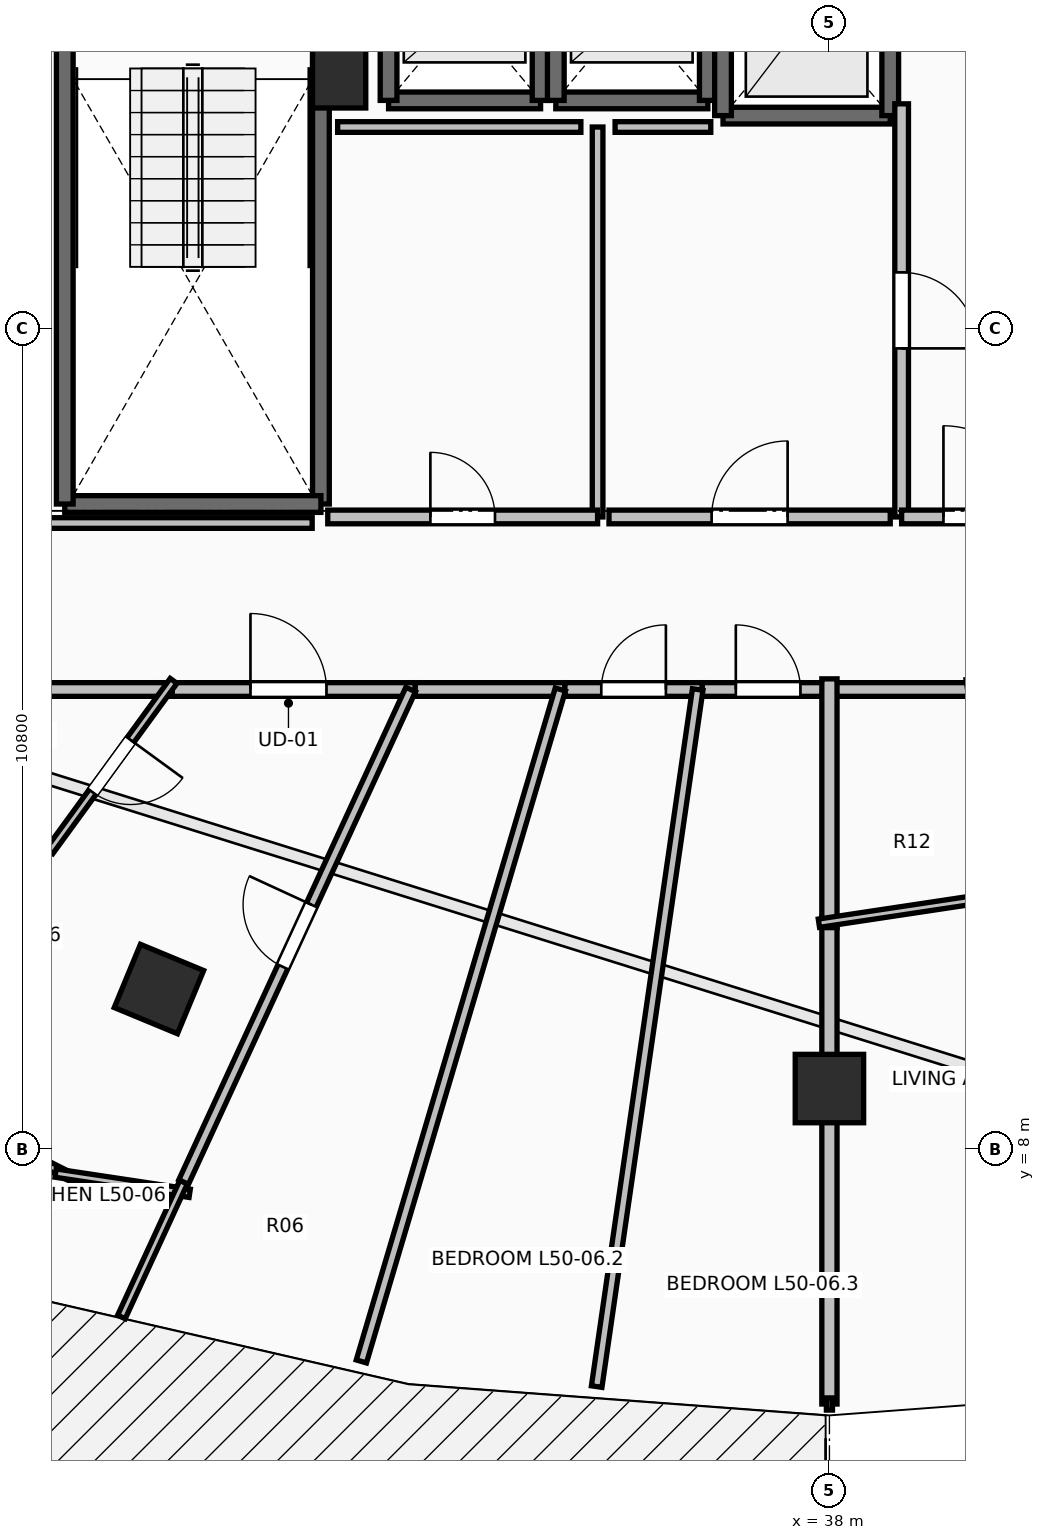
"""IFC4 building model, lengths in metres.
Left out: names, types, materials, properties, quantities, classifications, styles, units other than length and angle.
Written with IfcOpenShell. Run it as: python <this file> out.ifc"""

import sys

from ifc_helpers import new_model, si_unit, direction, frame, frame_2d, origin, origin_2d, place, context, subcontext, project, spatial, rectangle, extrude, element, fill, save


model = new_model("IFC4")
c1 = context("Model", 3, precision=1e-05, world=origin(), true_north=direction((0.0, 1.0)))
c2 = subcontext(c1, "Body", "Model", "MODEL_VIEW")
j1 = project(units=[si_unit("LENGTHUNIT", "METRE"), si_unit("PLANEANGLEUNIT", "RADIAN")], contexts=[c1])
p1 = place(None, origin())
s1 = spatial("IfcSite", under=j1, at=p1, CompositionType="ELEMENT")
p2 = place(p1, origin())
s2 = spatial("IfcBuilding", under=s1, at=p2, CompositionType="ELEMENT")
p3 = place(p2, frame((0.0, 0.0, 186.1)))
s3 = spatial("IfcBuildingStorey", under=s2, at=p3, CompositionType="ELEMENT", Elevation=186.1)
for number, where, z_axis, x_axis in (
    (1, (29.179, 10.109, 0.0), (0.0, 0.0, 1.0), (-0.383, -0.924, 0.0)),
    (2, (38.0, 8.8, 0.0), (0.0, 0.0, 1.0), (0.0, -1.0, 0.0)),
):
    element("IfcColumn", number, at=place(p3, frame(where, z_axis=z_axis, x_axis=x_axis)), inside=s3, PredefinedType="COLUMN", context=c2, shape_type="SweptSolid", body=[
        extrude(rectangle(XDim=0.9, YDim=0.9, at=origin_2d()), origin(), (0.0, 0.0, 1.0), 3.5),
    ])
p4 = place(p3, frame((31.55, 22.2, 0.0), z_axis=(0.0, 0.0, 1.0), x_axis=(1.0, 0.0, 0.0)))
e3 = element("IfcColumn", 3, at=p4, inside=s3, PredefinedType="PILASTER", context=c2, shape_type="SweptSolid", body=[
    extrude(rectangle(XDim=0.7, YDim=1.0, at=origin_2d()), origin(), (0.0, 0.0, 1.0), 3.5),
])
p5 = place(p3, frame((31.31, 23.91, 0.0), z_axis=(0.0, 0.0, 1.0), x_axis=(0.0, -1.0, 0.0)))
e4 = element("IfcWall", 4, at=p5, inside=s3, PredefinedType="SOLIDWALL", context=c2, shape_type="SweptSolid", body=[
    extrude(rectangle(XDim=7.42, YDim=0.22, at=frame_2d((3.71, 0.0))), origin(), (0.0, 0.0, 1.0), 3.24),
])
p6 = place(p3, frame((31.31, 16.49, 0.0), z_axis=(0.0, 0.0, 1.0), x_axis=(-1.0, 0.0, 0.0)))
e5 = element("IfcWall", 5, at=p6, inside=s3, PredefinedType="SOLIDWALL", context=c2, shape_type="SweptSolid", body=[
    extrude(rectangle(XDim=3.37, YDim=0.22, at=frame_2d((1.685, 0.0))), origin(), (0.0, 0.0, 1.0), 3.24),
])
p7 = place(p3, frame((27.94, 16.49, 0.0), z_axis=(0.0, 0.0, 1.0), x_axis=(0.0, 1.0, 0.0)))
e6 = element("IfcWall", 6, at=p7, inside=s3, PredefinedType="SOLIDWALL", context=c2, shape_type="SweptSolid", body=[
    extrude(rectangle(XDim=7.42, YDim=0.22, at=frame_2d((3.71, 0.0))), origin(), (0.0, 0.0, 1.0), 3.24),
])
p8 = place(p3, frame((32.2, 21.8, 0.0), z_axis=(0.0, 0.0, 1.0), x_axis=(1.0, 0.0, 0.0)))
e7 = element("IfcWall", 7, at=p8, inside=s3, PredefinedType="SOLIDWALL", context=c2, shape_type="SweptSolid", body=[
    extrude(rectangle(XDim=2.0, YDim=0.22, at=frame_2d((1.0, 0.0))), origin(), (0.0, 0.0, 1.0), 3.24),
])
for number, where, z_axis, x_axis in (
    (8, (34.2, 21.8, 0.0), (0.0, 0.0, 1.0), (0.0, 1.0, 0.0)),
    (9, (32.2, 24.2, 0.0), (0.0, 0.0, 1.0), (0.0, -1.0, 0.0)),
):
    element("IfcWall", number, at=place(p3, frame(where, z_axis=z_axis, x_axis=x_axis)), inside=s3, PredefinedType="SOLIDWALL", context=c2, shape_type="SweptSolid", body=[
        extrude(rectangle(XDim=2.4, YDim=0.22, at=frame_2d((1.2, 0.0))), origin(), (0.0, 0.0, 1.0), 3.24),
    ])
p9 = place(p3, frame((34.4, 21.8, 0.0), z_axis=(0.0, 0.0, 1.0), x_axis=(1.0, 0.0, 0.0)))
e10 = element("IfcWall", 10, at=p9, inside=s3, PredefinedType="SOLIDWALL", context=c2, shape_type="SweptSolid", body=[
    extrude(rectangle(XDim=2.0, YDim=0.22, at=frame_2d((1.0, 0.0))), origin(), (0.0, 0.0, 1.0), 3.24),
])
for number, where, z_axis, x_axis in (
    (11, (36.4, 21.8, 0.0), (0.0, 0.0, 1.0), (0.0, 1.0, 0.0)),
    (12, (34.4, 24.2, 0.0), (0.0, 0.0, 1.0), (0.0, -1.0, 0.0)),
):
    element("IfcWall", number, at=place(p3, frame(where, z_axis=z_axis, x_axis=x_axis)), inside=s3, PredefinedType="SOLIDWALL", context=c2, shape_type="SweptSolid", body=[
        extrude(rectangle(XDim=2.4, YDim=0.22, at=frame_2d((1.2, 0.0))), origin(), (0.0, 0.0, 1.0), 3.24),
    ])
p10 = place(p3, frame((36.6, 21.6, 0.0), z_axis=(0.0, 0.0, 1.0), x_axis=(1.0, 0.0, 0.0)))
e13 = element("IfcWall", 13, at=p10, inside=s3, PredefinedType="SOLIDWALL", context=c2, shape_type="SweptSolid", body=[
    extrude(rectangle(XDim=2.2, YDim=0.22, at=frame_2d((1.1, 0.0))), origin(), (0.0, 0.0, 1.0), 3.24),
])
for number, where, z_axis, x_axis in (
    (14, (38.8, 21.6, 0.0), (0.0, 0.0, 1.0), (0.0, 1.0, 0.0)),
    (15, (36.6, 24.2, 0.0), (0.0, 0.0, 1.0), (0.0, -1.0, 0.0)),
):
    element("IfcWall", number, at=place(p3, frame(where, z_axis=z_axis, x_axis=x_axis)), inside=s3, PredefinedType="SOLIDWALL", context=c2, shape_type="SweptSolid", body=[
        extrude(rectangle(XDim=2.6, YDim=0.22, at=frame_2d((1.3, 0.0))), origin(), (0.0, 0.0, 1.0), 3.24),
    ])
p11 = place(p3, frame((38.95, 21.755, 0.0), z_axis=(0.0, 0.0, 1.0), x_axis=(0.0, -1.0, 0.0)))
e16 = element("IfcWall", 16, at=p11, inside=s3, PredefinedType="PARTITIONING", context=c2, shape_type="SweptSolid", body=[
    extrude(rectangle(XDim=5.435, YDim=0.18, at=frame_2d((2.717, 0.0))), origin(), (0.0, 0.0, 1.0), 3.24),
])
p12 = place(p11, frame((2.218, 0.0, 0.0)))
e17 = element("IfcOpeningElement", 17, at=p12, cuts=e16, PredefinedType="OPENING", context=c2, shape_type="SweptSolid", body=[
    extrude(rectangle(XDim=1.0, YDim=2.15, at=frame_2d((0.5, 1.075))), frame((0.0, 0.105, 0.0), z_axis=(0.0, -1.0, 0.0), x_axis=(1.0, 0.0, 0.0)), (0.0, 0.0, 1.0), 0.21),
])
p13 = place(p3, frame((38.95, 16.32, 0.0), z_axis=(0.0, 0.0, 1.0), x_axis=(1.0, 0.0, 0.0)))
e18 = element("IfcWall", 18, at=p13, inside=s3, PredefinedType="PARTITIONING", context=c2, shape_type="SweptSolid", body=[
    extrude(rectangle(XDim=2.3, YDim=0.18, at=frame_2d((1.15, 0.0))), origin(), (0.0, 0.0, 1.0), 3.24),
])
p14 = place(p13, frame((0.55, 0.0, 0.0)))
e19 = element("IfcOpeningElement", 19, at=p14, cuts=e18, PredefinedType="OPENING", context=c2, shape_type="SweptSolid", body=[
    extrude(rectangle(XDim=1.2, YDim=2.15, at=frame_2d((0.6, 1.075))), frame((0.0, 0.105, 0.0), z_axis=(0.0, -1.0, 0.0), x_axis=(1.0, 0.0, 0.0)), (0.0, 0.0, 1.0), 0.21),
])
p15 = place(p3, frame((34.95, 16.32, 0.0), z_axis=(0.0, 0.0, 1.0), x_axis=(0.0, 1.0, 0.0)))
e20 = element("IfcWall", 20, at=p15, inside=s3, PredefinedType="PARTITIONING", context=c2, shape_type="SweptSolid", body=[
    extrude(rectangle(XDim=5.13, YDim=0.14, at=frame_2d((2.565, 0.0))), origin(), (0.0, 0.0, 1.0), 3.24),
])
p16 = place(p3, frame((31.4, 16.32, 0.0), z_axis=(0.0, 0.0, 1.0), x_axis=(1.0, 0.0, 0.0)))
e21 = element("IfcWall", 21, at=p16, inside=s3, PredefinedType="PARTITIONING", context=c2, shape_type="SweptSolid", body=[
    extrude(rectangle(XDim=3.55, YDim=0.18, at=frame_2d((1.775, 0.0))), origin(), (0.0, 0.0, 1.0), 3.24),
])
p17 = place(p16, frame((1.35, 0.0, 0.0)))
e22 = element("IfcOpeningElement", 22, at=p17, cuts=e21, PredefinedType="OPENING", context=c2, shape_type="SweptSolid", body=[
    extrude(rectangle(XDim=0.85, YDim=2.1, at=frame_2d((0.425, 1.05))), frame((0.0, 0.105, 0.0), z_axis=(0.0, -1.0, 0.0), x_axis=(1.0, 0.0, 0.0)), (0.0, 0.0, 1.0), 0.21),
])
p18 = place(p3, frame((35.1, 16.32, 0.0), z_axis=(0.0, 0.0, 1.0), x_axis=(1.0, 0.0, 0.0)))
e23 = element("IfcWall", 23, at=p18, inside=s3, PredefinedType="PARTITIONING", context=c2, shape_type="SweptSolid", body=[
    extrude(rectangle(XDim=3.7, YDim=0.18, at=frame_2d((1.85, 0.0))), origin(), (0.0, 0.0, 1.0), 3.24),
])
p19 = place(p18, frame((1.35, 0.0, 0.0)))
e24 = element("IfcOpeningElement", 24, at=p19, cuts=e23, PredefinedType="OPENING", context=c2, shape_type="SweptSolid", body=[
    extrude(rectangle(XDim=1.0, YDim=2.15, at=frame_2d((0.5, 1.075))), frame((0.0, 0.105, 0.0), z_axis=(0.0, -1.0, 0.0), x_axis=(1.0, 0.0, 0.0)), (0.0, 0.0, 1.0), 0.21),
])
p20 = place(p3, frame((29.215, 14.05, 0.0), z_axis=(0.0, 0.0, 1.0), x_axis=(1.0, 0.0, 0.0)))
e25 = element("IfcWall", 25, at=p20, inside=s3, PredefinedType="PARTITIONING", context=c2, shape_type="SweptSolid", body=[
    extrude(rectangle(XDim=3.336, YDim=0.18, at=frame_2d((1.668, 0.0))), origin(), (0.0, 0.0, 1.0), 3.24),
])
p21 = place(p20, frame((1.168, 0.0, 0.0)))
e26 = element("IfcOpeningElement", 26, at=p21, cuts=e25, PredefinedType="OPENING", context=c2, shape_type="SweptSolid", body=[
    extrude(rectangle(XDim=1.0, YDim=2.15, at=frame_2d((0.5, 1.075))), frame((0.0, 0.105, 0.0), z_axis=(0.0, -1.0, 0.0), x_axis=(1.0, 0.0, 0.0)), (0.0, 0.0, 1.0), 0.21),
])
p22 = place(p3, frame((25.97, 14.05, 0.0), z_axis=(0.0, 0.0, 1.0), x_axis=(1.0, 0.0, 0.0)))
e27 = element("IfcWall", 27, at=p22, inside=s3, PredefinedType="PARTITIONING", context=c2, shape_type="SweptSolid", body=[
    extrude(rectangle(XDim=3.385, YDim=0.18, at=frame_2d((1.692, 0.0))), origin(), (0.0, 0.0, 1.0), 2.432),
])
p23 = place(p3, frame((32.551, 14.05, 0.0), z_axis=(0.0, 0.0, 1.0), x_axis=(1.0, 0.0, 0.0)))
e28 = element("IfcWall", 28, at=p23, inside=s3, PredefinedType="PARTITIONING", context=c2, shape_type="SweptSolid", body=[
    extrude(rectangle(XDim=1.969, YDim=0.18, at=frame_2d((0.984, 0.0))), origin(), (0.0, 0.0, 1.0), 3.24),
])
p24 = place(p3, frame((34.52, 14.05, 0.0), z_axis=(0.0, 0.0, 1.0), x_axis=(1.0, 0.0, 0.0)))
e29 = element("IfcWall", 29, at=p24, inside=s3, PredefinedType="PARTITIONING", context=c2, shape_type="SweptSolid", body=[
    extrude(rectangle(XDim=1.807, YDim=0.18, at=frame_2d((0.903, 0.0))), origin(), (0.0, 0.0, 1.0), 3.24),
])
p25 = place(p24, frame((0.479, 0.0, 0.0)))
e30 = element("IfcOpeningElement", 30, at=p25, cuts=e29, PredefinedType="OPENING", context=c2, shape_type="SweptSolid", body=[
    extrude(rectangle(XDim=0.85, YDim=2.1, at=frame_2d((0.425, 1.05))), frame((0.0, 0.105, 0.0), z_axis=(0.0, -1.0, 0.0), x_axis=(1.0, 0.0, 0.0)), (0.0, 0.0, 1.0), 0.21),
])
p26 = place(p3, frame((36.327, 14.05, 0.0), z_axis=(0.0, 0.0, 1.0), x_axis=(1.0, 0.0, 0.0)))
e31 = element("IfcWall", 31, at=p26, inside=s3, PredefinedType="PARTITIONING", context=c2, shape_type="SweptSolid", body=[
    extrude(rectangle(XDim=1.733, YDim=0.18, at=frame_2d((0.867, 0.0))), origin(), (0.0, 0.0, 1.0), 2.922),
])
p27 = place(p26, frame((0.441, 0.0, 0.0)))
e32 = element("IfcOpeningElement", 32, at=p27, cuts=e31, PredefinedType="OPENING", context=c2, shape_type="SweptSolid", body=[
    extrude(rectangle(XDim=0.85, YDim=2.1, at=frame_2d((0.425, 1.05))), frame((0.0, 0.105, 0.0), z_axis=(0.0, -1.0, 0.0), x_axis=(1.0, 0.0, 0.0)), (0.0, 0.0, 1.0), 0.21),
])
p28 = place(p3, frame((37.92, 14.05, 0.0), z_axis=(0.0, 0.0, 1.0), x_axis=(1.0, 0.0, 0.0)))
e33 = element("IfcWall", 33, at=p28, inside=s3, PredefinedType="PARTITIONING", context=c2, shape_type="SweptSolid", body=[
    extrude(rectangle(XDim=2.033, YDim=0.18, at=frame_2d((1.017, 0.0))), origin(), (0.0, 0.0, 1.0), 2.922),
])
p29 = place(p3, frame((29.372, 14.163, 0.0), z_axis=(0.0, 0.0, 1.0), x_axis=(-0.589066743954, -0.808084383693, 0.0)))
e34 = element("IfcWall", 34, at=p29, inside=s3, PredefinedType="PARTITIONING", context=c2, shape_type="SweptSolid", body=[
    extrude(rectangle(XDim=2.772, YDim=0.11, at=frame_2d((1.386, 0.0))), origin(), (0.0, 0.0, 1.0), 2.432),
])
p30 = place(p29, frame((0.961, 0.0, 0.0)))
e35 = element("IfcOpeningElement", 35, at=p30, cuts=e34, PredefinedType="OPENING", context=c2, shape_type="SweptSolid", body=[
    extrude(rectangle(XDim=0.85, YDim=2.1, at=frame_2d((0.425, 1.05))), frame((0.0, 0.07, 0.0), z_axis=(0.0, -1.0, 0.0), x_axis=(1.0, 0.0, 0.0)), (0.0, 0.0, 1.0), 0.14),
])
p31 = place(p3, frame((25.675, 8.82, 0.0), z_axis=(0.0, 0.0, 1.0), x_axis=(0.892628057427, -0.450793911999, 0.0)))
e36 = element("IfcWall", 36, at=p31, inside=s3, PredefinedType="PARTITIONING", context=c2, shape_type="SweptSolid", body=[
    extrude(rectangle(XDim=2.698, YDim=0.11, at=frame_2d((1.349, 0.0))), origin(), (0.0, 0.0, 1.0), 3.24),
])
p32 = place(p31, frame((0.899, 0.0, 0.0)))
e37 = element("IfcOpeningElement", 37, at=p32, cuts=e36, PredefinedType="OPENING", context=c2, shape_type="SweptSolid", body=[
    extrude(rectangle(XDim=0.9, YDim=2.1, at=frame_2d((0.45, 1.05))), frame((0.0, 0.07, 0.0), z_axis=(0.0, -1.0, 0.0), x_axis=(1.0, 0.0, 0.0)), (0.0, 0.0, 1.0), 0.14),
])
p33 = place(p3, frame((27.82, 7.688, 0.0), z_axis=(0.0, 0.0, 1.0), x_axis=(0.988830695744, -0.149043131857, 0.0)))
e38 = element("IfcWall", 38, at=p33, inside=s3, PredefinedType="PARTITIONING", context=c2, shape_type="SweptSolid", body=[
    extrude(rectangle(XDim=1.784, YDim=0.11, at=frame_2d((0.892, 0.0))), origin(), (0.0, 0.0, 1.0), 3.24),
])
p34 = place(p3, frame((29.504, 7.57, 0.0), z_axis=(0.0, 0.0, 1.0), x_axis=(-0.418662115749, -0.908142077451, 0.0)))
e39 = element("IfcWall", 39, at=p34, inside=s3, PredefinedType="PARTITIONING", context=c2, shape_type="SweptSolid", body=[
    extrude(rectangle(XDim=1.955, YDim=0.11, at=frame_2d((0.977, 0.0))), origin(), (0.0, 0.0, 1.0), 3.24),
])
p35 = place(p3, frame((29.504, 7.57, 0.0), z_axis=(0.0, 0.0, 1.0), x_axis=(0.418658902348, 0.908143558852, 0.0)))
e40 = element("IfcWall", 40, at=p35, inside=s3, PredefinedType="PARTITIONING", context=c2, shape_type="SweptSolid", body=[
    extrude(rectangle(XDim=7.135, YDim=0.14, at=frame_2d((3.568, 0.0))), origin(), (0.0, 0.0, 1.0), 2.774),
])
p36 = place(p35, frame((3.118, 0.0, 0.0)))
e41 = element("IfcOpeningElement", 41, at=p36, cuts=e40, PredefinedType="OPENING", context=c2, shape_type="SweptSolid", body=[
    extrude(rectangle(XDim=0.9, YDim=2.1, at=frame_2d((0.45, 1.05))), frame((0.0, 0.085, 0.0), z_axis=(0.0, -1.0, 0.0), x_axis=(1.0, 0.0, 0.0)), (0.0, 0.0, 1.0), 0.17),
])
p37 = place(p3, frame((31.842, 5.21, 0.0), z_axis=(0.0, 0.0, 1.0), x_axis=(0.283952183478, 0.958838441813, 0.0)))
e42 = element("IfcWall", 42, at=p37, inside=s3, PredefinedType="PARTITIONING", context=c2, shape_type="SweptSolid", body=[
    extrude(rectangle(XDim=9.219, YDim=0.14, at=frame_2d((4.61, 0.0))), origin(), (0.0, 0.0, 1.0), 2.774),
])
p38 = place(p3, frame((34.938, 4.879, 0.0), z_axis=(0.0, 0.0, 1.0), x_axis=(0.143423836858, 0.989661357749, 0.0)))
e43 = element("IfcWall", 43, at=p38, inside=s3, PredefinedType="PARTITIONING", context=c2, shape_type="SweptSolid", body=[
    extrude(rectangle(XDim=9.267, YDim=0.14, at=frame_2d((4.633, 0.0))), origin(), (0.0, 0.0, 1.0), 2.774),
])
p39 = place(p3, frame((38.0, 4.65, 0.0), z_axis=(0.0, 0.0, 1.0), x_axis=(0.0, 1.0, 0.0)))
e44 = element("IfcWall", 44, at=p39, inside=s3, PredefinedType="PARTITIONING", context=c2, shape_type="SweptSolid", body=[
    extrude(rectangle(XDim=6.407, YDim=0.2, at=frame_2d((3.204, 0.0))), origin(), (0.0, 0.0, 1.0), 3.24),
])
p40 = place(p3, frame((38.0, 10.917, 0.0), z_axis=(0.0, 0.0, 1.0), x_axis=(0.0, 1.0, 0.0)))
e45 = element("IfcWall", 45, at=p40, inside=s3, PredefinedType="PARTITIONING", context=c2, shape_type="SweptSolid", body=[
    extrude(rectangle(XDim=3.273, YDim=0.2, at=frame_2d((1.636, 0.0))), origin(), (0.0, 0.0, 1.0), 2.874),
])
p41 = place(p3, frame((40.436, 11.363, 0.0), z_axis=(0.0, 0.0, 1.0), x_axis=(-0.988852287037, -0.148899813371, 0.0)))
e46 = element("IfcWall", 46, at=p41, inside=s3, PredefinedType="PARTITIONING", context=c2, shape_type="SweptSolid", body=[
    extrude(rectangle(XDim=2.604, YDim=0.11, at=frame_2d((1.302, 0.0))), origin(), (0.0, 0.0, 1.0), 3.24),
])
p42 = place(p3, frame((34.73, 21.45, 0.0), z_axis=(0.0, 0.0, 1.0), x_axis=(-1.0, 0.0, 0.0)))
e47 = element("IfcWall", 47, at=p42, inside=s3, PredefinedType="PARTITIONING", context=c2, shape_type="SweptSolid", body=[
    extrude(rectangle(XDim=3.2, YDim=0.14, at=frame_2d((1.6, 0.0))), origin(), (0.0, 0.0, 1.0), 3.24),
])
p43 = place(p3, frame((36.439, 21.45, 0.0), z_axis=(0.0, 0.0, 1.0), x_axis=(-1.0, 0.0, 0.0)))
e48 = element("IfcWall", 48, at=p43, inside=s3, PredefinedType="PARTITIONING", context=c2, shape_type="SweptSolid", body=[
    extrude(rectangle(XDim=1.259, YDim=0.14, at=frame_2d((0.629, 0.0))), origin(), (0.0, 0.0, 1.0), 3.24),
])
p44 = place(p3, frame((27.45, 16.24, 0.0), z_axis=(0.0, 0.0, 1.0), x_axis=(1.0, 0.0, 0.0)))
e49 = element("IfcWall", 49, at=p44, inside=s3, PredefinedType="PARTITIONING", context=c2, shape_type="SweptSolid", body=[
    extrude(rectangle(XDim=3.745, YDim=0.14, at=frame_2d((1.873, 0.0))), origin(), (0.0, 0.0, 1.0), 2.432),
])
p45 = place(p12, origin())
e50 = element("IfcDoor", 50, at=p45, inside=s3, OperationType="SINGLE_SWING_RIGHT", PredefinedType="DOOR", context=c2, shape_type="SweptSolid", body=[
    extrude(rectangle(XDim=1.0, YDim=2.15, at=frame_2d((0.5, 1.075))), frame((0.0, 0.025, 0.0), z_axis=(0.0, -1.0, 0.0), x_axis=(1.0, 0.0, 0.0)), (0.0, 0.0, 1.0), 0.05),
])
fill(e17, e50)
p46 = place(p14, origin())
e51 = element("IfcDoor", 51, at=p46, inside=s3, OperationType="SINGLE_SWING_LEFT", PredefinedType="DOOR", context=c2, shape_type="SweptSolid", body=[
    extrude(rectangle(XDim=1.2, YDim=2.15, at=frame_2d((0.6, 1.075))), frame((0.0, 0.025, 0.0), z_axis=(0.0, -1.0, 0.0), x_axis=(1.0, 0.0, 0.0)), (0.0, 0.0, 1.0), 0.05),
])
fill(e19, e51)
p47 = place(p17, origin())
e52 = element("IfcDoor", 52, at=p47, inside=s3, OperationType="SINGLE_SWING_LEFT", PredefinedType="DOOR", context=c2, shape_type="SweptSolid", body=[
    extrude(rectangle(XDim=0.85, YDim=2.1, at=frame_2d((0.425, 1.05))), frame((0.0, 0.025, 0.0), z_axis=(0.0, -1.0, 0.0), x_axis=(1.0, 0.0, 0.0)), (0.0, 0.0, 1.0), 0.05),
])
fill(e22, e52)
p48 = place(p19, origin())
e53 = element("IfcDoor", 53, at=p48, inside=s3, OperationType="SINGLE_SWING_RIGHT", PredefinedType="DOOR", context=c2, shape_type="SweptSolid", body=[
    extrude(rectangle(XDim=1.0, YDim=2.15, at=frame_2d((0.5, 1.075))), frame((0.0, 0.025, 0.0), z_axis=(0.0, -1.0, 0.0), x_axis=(1.0, 0.0, 0.0)), (0.0, 0.0, 1.0), 0.05),
])
fill(e24, e53)
p49 = place(p21, origin())
e54 = element("IfcDoor", 54, at=p49, inside=s3, OperationType="SINGLE_SWING_LEFT", PredefinedType="DOOR", context=c2, shape_type="SweptSolid", body=[
    extrude(rectangle(XDim=1.0, YDim=2.15, at=frame_2d((0.5, 1.075))), frame((0.0, 0.025, 0.0), z_axis=(0.0, -1.0, 0.0), x_axis=(1.0, 0.0, 0.0)), (0.0, 0.0, 1.0), 0.05),
])
fill(e26, e54)
p50 = place(p30, origin())
e55 = element("IfcDoor", 55, at=p50, inside=s3, OperationType="SINGLE_SWING_LEFT", PredefinedType="DOOR", context=c2, shape_type="SweptSolid", body=[
    extrude(rectangle(XDim=0.85, YDim=2.1, at=frame_2d((0.425, 1.05))), frame((0.0, 0.025, 0.0), z_axis=(0.0, -1.0, 0.0), x_axis=(1.0, 0.0, 0.0)), (0.0, 0.0, 1.0), 0.05),
])
fill(e35, e55)
p51 = place(p36, origin())
e56 = element("IfcDoor", 56, at=p51, inside=s3, OperationType="SINGLE_SWING_RIGHT", PredefinedType="DOOR", context=c2, shape_type="SweptSolid", body=[
    extrude(rectangle(XDim=0.9, YDim=2.1, at=frame_2d((0.45, 1.05))), frame((0.0, 0.025, 0.0), z_axis=(0.0, -1.0, 0.0), x_axis=(1.0, 0.0, 0.0)), (0.0, 0.0, 1.0), 0.05),
])
fill(e41, e56)
p52 = place(p25, origin())
e57 = element("IfcDoor", 57, at=p52, inside=s3, OperationType="SINGLE_SWING_RIGHT", PredefinedType="DOOR", context=c2, shape_type="SweptSolid", body=[
    extrude(rectangle(XDim=0.85, YDim=2.1, at=frame_2d((0.425, 1.05))), frame((0.0, 0.025, 0.0), z_axis=(0.0, -1.0, 0.0), x_axis=(1.0, 0.0, 0.0)), (0.0, 0.0, 1.0), 0.05),
])
fill(e30, e57)
p53 = place(p27, origin())
e58 = element("IfcDoor", 58, at=p53, inside=s3, OperationType="SINGLE_SWING_LEFT", PredefinedType="DOOR", context=c2, shape_type="SweptSolid", body=[
    extrude(rectangle(XDim=0.85, YDim=2.1, at=frame_2d((0.425, 1.05))), frame((0.0, 0.025, 0.0), z_axis=(0.0, -1.0, 0.0), x_axis=(1.0, 0.0, 0.0)), (0.0, 0.0, 1.0), 0.05),
])
fill(e32, e58)
save(model, sys.argv[1])
